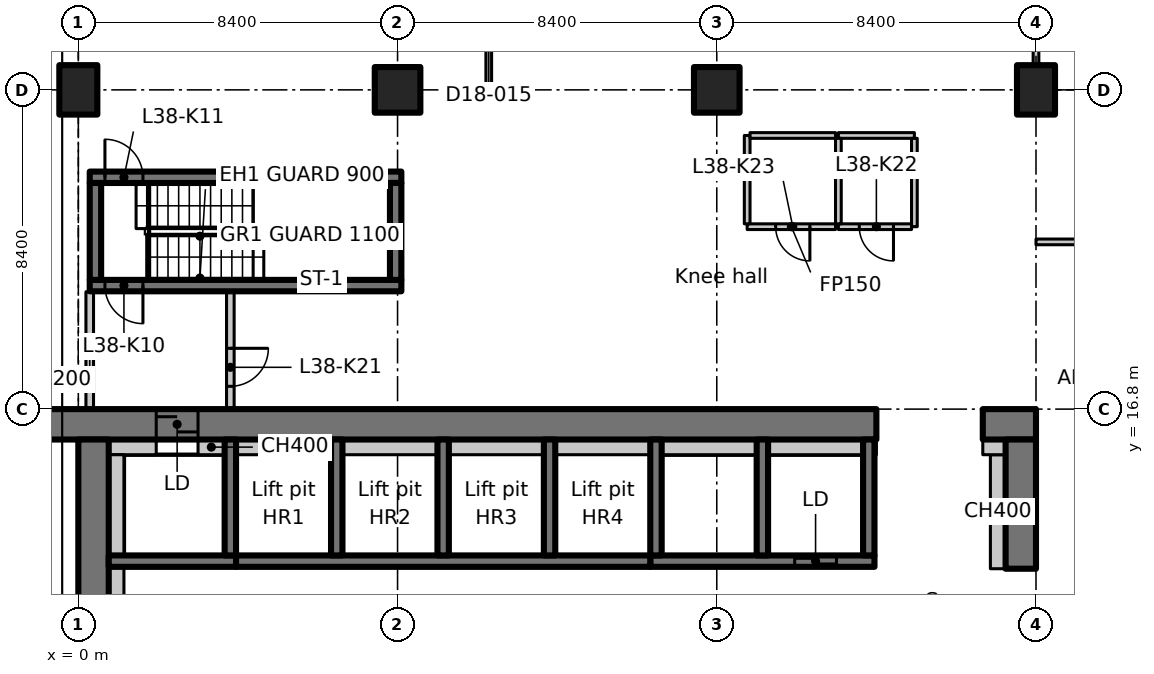
"""IFC4 building model, lengths in metres.
Left out: names, types, materials, properties, quantities, classifications, styles, units other than length and angle.
Written with IfcOpenShell. Run it as: python <this file> out.ifc"""

import sys

from ifc_helpers import new_model, si_unit, direction, frame, frame_2d, origin, origin_2d, place, context, subcontext, project, spatial, polyline, rectangle, outline, extrude, element, fill, save


model = new_model("IFC4")
c1 = context("Model", 3, precision=1e-05, world=origin(), true_north=direction((0.0, 1.0)))
c2 = subcontext(c1, "Body", "Model", "MODEL_VIEW")
j1 = project(units=[si_unit("LENGTHUNIT", "METRE"), si_unit("PLANEANGLEUNIT", "RADIAN")], contexts=[c1])
p1 = place(None, origin())
s1 = spatial("IfcSite", under=j1, at=p1, CompositionType="ELEMENT")
p2 = place(p1, origin())
s2 = spatial("IfcBuilding", under=s1, at=p2, CompositionType="ELEMENT")
p3 = place(p2, frame((0.0, 0.0, 152.9)))
s3 = spatial("IfcBuildingStorey", under=s2, at=p3, CompositionType="ELEMENT", Elevation=152.9)
p4 = place(p3, frame((0.0, 25.2, 0.0), z_axis=(0.0, 0.0, 1.0), x_axis=(1.0, 0.0, 0.0)))
e1 = element("IfcColumn", 1, at=p4, inside=s3, PredefinedType="COLUMN", context=c2, shape_type="SweptSolid", body=[
    extrude(rectangle(XDim=1.0, YDim=1.3, at=origin_2d()), origin(), (0.0, 0.0, 1.0), 3.3),
])
for number, where, z_axis, x_axis in (
    (2, (8.4, 25.2, 0.0), (0.0, 0.0, 1.0), (1.0, 0.0, 0.0)),
    (3, (16.8, 25.2, 0.0), (0.0, 0.0, 1.0), (1.0, 0.0, 0.0)),
):
    element("IfcColumn", number, at=place(p3, frame(where, z_axis=z_axis, x_axis=x_axis)), inside=s3, PredefinedType="COLUMN", context=c2, shape_type="SweptSolid", body=[
        extrude(rectangle(XDim=1.2, YDim=1.2, at=origin_2d()), origin(), (0.0, 0.0, 1.0), 3.3),
    ])
p5 = place(p3, frame((25.2, 25.2, 0.0), z_axis=(0.0, 0.0, 1.0), x_axis=(1.0, 0.0, 0.0)))
e4 = element("IfcColumn", 4, at=p5, inside=s3, PredefinedType="COLUMN", context=c2, shape_type="SweptSolid", body=[
    extrude(rectangle(XDim=1.0, YDim=1.3, at=origin_2d()), origin(), (0.0, 0.0, 1.0), 3.3),
])
p6 = place(p3, frame((-1.1, 16.4, 0.0), z_axis=(0.0, 0.0, 1.0), x_axis=(1.0, 0.0, 0.0)))
e5 = element("IfcWall", 5, at=p6, inside=s3, PredefinedType="SHEAR", context=c2, shape_type="SweptSolid", body=[
    extrude(rectangle(XDim=22.1, YDim=0.8, at=frame_2d((11.05, 0.0))), origin(), (0.0, 0.0, 1.0), 3.3),
])
p7 = place(p6, frame((3.15, 0.0, 0.0)))
e6 = element("IfcOpeningElement", 6, at=p7, cuts=e5, PredefinedType="OPENING", context=c2, shape_type="SweptSolid", body=[
    extrude(rectangle(XDim=1.1, YDim=2.3, at=frame_2d((0.55, 1.15))), frame((0.0, 0.41, 0.0), z_axis=(0.0, -1.0, 0.0), x_axis=(1.0, 0.0, 0.0)), (0.0, 0.0, 1.0), 0.82),
])
p8 = place(p3, frame((23.8, 16.4, 0.0), z_axis=(0.0, 0.0, 1.0), x_axis=(1.0, 0.0, 0.0)))
e7 = element("IfcWall", 7, at=p8, inside=s3, PredefinedType="SHEAR", context=c2, shape_type="SweptSolid", body=[
    extrude(rectangle(XDim=1.4, YDim=0.8, at=frame_2d((0.7, 0.0))), origin(), (0.0, 0.0, 1.0), 3.3),
])
p9 = place(p3, frame((0.4, 7.136, 0.0), z_axis=(0.0, 0.0, 1.0), x_axis=(0.0, 1.0, 0.0)))
e8 = element("IfcWall", 8, at=p9, inside=s3, PredefinedType="SHEAR", context=c2, shape_type="SweptSolid", body=[
    extrude(rectangle(XDim=8.864, YDim=0.8, at=frame_2d((4.432, 0.0))), origin(), (0.0, 0.0, 1.0), 3.3),
])
p10 = place(p3, frame((24.8, 12.6, 0.0), z_axis=(0.0, 0.0, 1.0), x_axis=(0.0, 1.0, 0.0)))
e9 = element("IfcWall", 9, at=p10, inside=s3, PredefinedType="SHEAR", context=c2, shape_type="SweptSolid", body=[
    extrude(rectangle(XDim=3.4, YDim=0.8, at=frame_2d((1.7, 0.0))), origin(), (0.0, 0.0, 1.0), 3.3),
])
p11 = place(p3, frame((24.2, 12.6, 0.0), z_axis=(0.0, 0.0, 1.0), x_axis=(0.0, 1.0, 0.0)))
e10 = element("IfcWall", 10, at=p11, inside=s3, PredefinedType="PARTITIONING", context=c2, shape_type="SweptSolid", body=[
    extrude(rectangle(XDim=3.0, YDim=0.4, at=frame_2d((1.5, 0.0))), origin(), (0.0, 0.0, 1.0), 3.3),
])
p12 = place(p3, frame((0.8, 15.8, 0.0), z_axis=(0.0, 0.0, 1.0), x_axis=(1.0, 0.0, 0.0)))
e11 = element("IfcWall", 11, at=p12, inside=s3, PredefinedType="PARTITIONING", context=c2, shape_type="SweptSolid", body=[
    extrude(rectangle(XDim=1.25, YDim=0.4, at=frame_2d((0.625, 0.0))), origin(), (0.0, 0.0, 1.0), 3.3),
])
p13 = place(p3, frame((23.8, 15.8, 0.0), z_axis=(0.0, 0.0, 1.0), x_axis=(1.0, 0.0, 0.0)))
e12 = element("IfcWall", 12, at=p13, inside=s3, PredefinedType="PARTITIONING", context=c2, shape_type="SweptSolid", body=[
    extrude(rectangle(XDim=0.6, YDim=0.4, at=frame_2d((0.3, 0.0))), origin(), (0.0, 0.0, 1.0), 3.3),
])
p14 = place(p3, frame((0.8, 12.8, 0.0), z_axis=(0.0, 0.0, 1.0), x_axis=(1.0, 0.0, 0.0)))
e13 = element("IfcWall", 13, at=p14, inside=s3, PredefinedType="SHEAR", context=c2, shape_type="SweptSolid", body=[
    extrude(rectangle(XDim=3.35, YDim=0.3, at=frame_2d((1.675, 0.0))), origin(), (0.0, 0.0, 1.0), 3.3),
])
p15 = place(p3, frame((4.0, 12.95, 0.0), z_axis=(0.0, 0.0, 1.0), x_axis=(0.0, 1.0, 0.0)))
e14 = element("IfcWall", 14, at=p15, inside=s3, PredefinedType="SHEAR", context=c2, shape_type="SweptSolid", body=[
    extrude(rectangle(XDim=3.05, YDim=0.3, at=frame_2d((1.525, 0.0))), origin(), (0.0, 0.0, 1.0), 3.3),
])
p16 = place(p3, frame((15.05, 12.8, 0.0), z_axis=(0.0, 0.0, 1.0), x_axis=(1.0, 0.0, 0.0)))
e15 = element("IfcWall", 15, at=p16, inside=s3, PredefinedType="SHEAR", context=c2, shape_type="SweptSolid", body=[
    extrude(rectangle(XDim=5.9, YDim=0.3, at=frame_2d((2.95, 0.0))), origin(), (0.0, 0.0, 1.0), 3.3),
])
p17 = place(p16, frame((3.8, 0.0, 0.0)))
e16 = element("IfcOpeningElement", 16, at=p17, cuts=e15, PredefinedType="OPENING", context=c2, shape_type="SweptSolid", body=[
    extrude(rectangle(XDim=1.1, YDim=2.3, at=frame_2d((0.55, 1.15))), frame((0.0, 0.16, 0.0), z_axis=(0.0, -1.0, 0.0), x_axis=(1.0, 0.0, 0.0)), (0.0, 0.0, 1.0), 0.32),
])
for number, where, z_axis, x_axis in (
    (17, (15.2, 12.95, 0.0), (0.0, 0.0, 1.0), (0.0, 1.0, 0.0)),
    (18, (18.0, 12.95, 0.0), (0.0, 0.0, 1.0), (0.0, 1.0, 0.0)),
    (19, (20.8, 12.95, 0.0), (0.0, 0.0, 1.0), (0.0, 1.0, 0.0)),
):
    element("IfcWall", number, at=place(p3, frame(where, z_axis=z_axis, x_axis=x_axis)), inside=s3, PredefinedType="SHEAR", context=c2, shape_type="SweptSolid", body=[
        extrude(rectangle(XDim=3.05, YDim=0.3, at=frame_2d((1.525, 0.0))), origin(), (0.0, 0.0, 1.0), 3.3),
    ])
p18 = place(p3, frame((4.15, 12.8, 0.0), z_axis=(0.0, 0.0, 1.0), x_axis=(1.0, 0.0, 0.0)))
e20 = element("IfcWall", 20, at=p18, inside=s3, PredefinedType="SHEAR", context=c2, shape_type="SweptSolid", body=[
    extrude(rectangle(XDim=10.9, YDim=0.3, at=frame_2d((5.45, 0.0))), origin(), (0.0, 0.0, 1.0), 3.3),
])
for number, where, z_axis, x_axis in (
    (21, (6.8, 12.95, 0.0), (0.0, 0.0, 1.0), (0.0, 1.0, 0.0)),
    (22, (9.6, 12.95, 0.0), (0.0, 0.0, 1.0), (0.0, 1.0, 0.0)),
    (23, (12.4, 12.95, 0.0), (0.0, 0.0, 1.0), (0.0, 1.0, 0.0)),
):
    element("IfcWall", number, at=place(p3, frame(where, z_axis=z_axis, x_axis=x_axis)), inside=s3, PredefinedType="SHEAR", context=c2, shape_type="SweptSolid", body=[
        extrude(rectangle(XDim=3.05, YDim=0.3, at=frame_2d((1.525, 0.0))), origin(), (0.0, 0.0, 1.0), 3.3),
    ])
p19 = place(p3, frame((8.5, 20.05, 0.0), z_axis=(0.0, 0.0, 1.0), x_axis=(-1.0, 0.0, 0.0)))
e24 = element("IfcWall", 24, at=p19, inside=s3, PredefinedType="SHEAR", context=c2, shape_type="SweptSolid", body=[
    extrude(rectangle(XDim=8.2, YDim=0.3, at=frame_2d((4.1, 0.0))), origin(), (0.0, 0.0, 1.0), 3.3),
])
p20 = place(p19, frame((6.8, 0.0, 0.0)))
e25 = element("IfcOpeningElement", 25, at=p20, cuts=e24, PredefinedType="OPENING", context=c2, shape_type="SweptSolid", body=[
    extrude(rectangle(XDim=1.0, YDim=2.1, at=frame_2d((0.5, 1.05))), frame((0.0, 0.16, 0.0), z_axis=(0.0, -1.0, 0.0), x_axis=(1.0, 0.0, 0.0)), (0.0, 0.0, 1.0), 0.32),
])
p21 = place(p3, frame((0.3, 22.9, 0.0), z_axis=(0.0, 0.0, 1.0), x_axis=(1.0, 0.0, 0.0)))
e26 = element("IfcWall", 26, at=p21, inside=s3, PredefinedType="SHEAR", context=c2, shape_type="SweptSolid", body=[
    extrude(rectangle(XDim=8.2, YDim=0.3, at=frame_2d((4.1, 0.0))), origin(), (0.0, 0.0, 1.0), 3.3),
])
p22 = place(p21, frame((0.4, 0.0, 0.0)))
e27 = element("IfcOpeningElement", 27, at=p22, cuts=e26, PredefinedType="OPENING", context=c2, shape_type="SweptSolid", body=[
    extrude(rectangle(XDim=1.0, YDim=2.1, at=frame_2d((0.5, 1.05))), frame((0.0, 0.16, 0.0), z_axis=(0.0, -1.0, 0.0), x_axis=(1.0, 0.0, 0.0)), (0.0, 0.0, 1.0), 0.32),
])
for number, where, z_axis, x_axis in (
    (28, (0.45, 20.2, 0.0), (0.0, 0.0, 1.0), (0.0, 1.0, 0.0)),
    (29, (8.35, 20.2, 0.0), (0.0, 0.0, 1.0), (0.0, 1.0, 0.0)),
):
    element("IfcWall", number, at=place(p3, frame(where, z_axis=z_axis, x_axis=x_axis)), inside=s3, PredefinedType="SHEAR", context=c2, shape_type="SweptSolid", body=[
        extrude(rectangle(XDim=2.55, YDim=0.3, at=frame_2d((1.275, 0.0))), origin(), (0.0, 0.0, 1.0), 3.3),
    ])
p23 = place(p3, frame((0.3, 16.812, 0.0), z_axis=(0.0, 0.0, 1.0), x_axis=(0.0, 1.0, 0.0)))
e30 = element("IfcWall", 30, at=p23, inside=s3, PredefinedType="PARTITIONING", context=c2, shape_type="SweptSolid", body=[
    extrude(rectangle(XDim=3.076, YDim=0.2, at=frame_2d((1.538, 0.0))), origin(), (0.0, 0.0, 1.0), 2.93),
])
p24 = place(p3, frame((4.0, 19.888, 0.0), z_axis=(0.0, 0.0, 1.0), x_axis=(0.0, -1.0, 0.0)))
e31 = element("IfcWall", 31, at=p24, inside=s3, PredefinedType="PARTITIONING", context=c2, shape_type="SweptSolid", body=[
    extrude(rectangle(XDim=3.076, YDim=0.2, at=frame_2d((1.538, 0.0))), origin(), (0.0, 0.0, 1.0), 3.3),
])
p25 = place(p24, frame((1.488, 0.0, 0.0)))
e32 = element("IfcOpeningElement", 32, at=p25, cuts=e31, PredefinedType="OPENING", context=c2, shape_type="SweptSolid", body=[
    extrude(rectangle(XDim=1.0, YDim=2.1, at=frame_2d((0.5, 1.05))), frame((0.0, 0.11, 0.0), z_axis=(0.0, -1.0, 0.0), x_axis=(1.0, 0.0, 0.0)), (0.0, 0.0, 1.0), 0.22),
])
p26 = place(p3, frame((20.0, 24.0, 0.0), z_axis=(0.0, 0.0, 1.0), x_axis=(1.0, 0.0, 0.0)))
e33 = element("IfcWall", 33, at=p26, inside=s3, PredefinedType="PARTITIONING", context=c2, shape_type="SweptSolid", body=[
    extrude(rectangle(XDim=2.0, YDim=0.15, at=frame_2d((1.0, 0.0))), origin(), (0.0, 0.0, 1.0), 3.3),
])
p27 = place(p3, frame((22.0, 23.925, 0.0), z_axis=(0.0, 0.0, 1.0), x_axis=(0.0, -1.0, 0.0)))
e34 = element("IfcWall", 34, at=p27, inside=s3, PredefinedType="PARTITIONING", context=c2, shape_type="SweptSolid", body=[
    extrude(rectangle(XDim=2.325, YDim=0.15, at=frame_2d((1.163, 0.0))), origin(), (0.0, 0.0, 1.0), 3.3),
])
p28 = place(p3, frame((21.925, 21.6, 0.0), z_axis=(0.0, 0.0, 1.0), x_axis=(-1.0, 0.0, 0.0)))
e35 = element("IfcWall", 35, at=p28, inside=s3, PredefinedType="PARTITIONING", context=c2, shape_type="SweptSolid", body=[
    extrude(rectangle(XDim=1.925, YDim=0.15, at=frame_2d((0.962, 0.0))), origin(), (0.0, 0.0, 1.0), 3.3),
])
p29 = place(p28, frame((0.475, 0.0, 0.0)))
e36 = element("IfcOpeningElement", 36, at=p29, cuts=e35, PredefinedType="OPENING", context=c2, shape_type="SweptSolid", body=[
    extrude(rectangle(XDim=0.9, YDim=2.1, at=frame_2d((0.45, 1.05))), frame((0.0, 0.085, 0.0), z_axis=(0.0, -1.0, 0.0), x_axis=(1.0, 0.0, 0.0)), (0.0, 0.0, 1.0), 0.17),
])
p30 = place(p3, frame((20.0, 21.675, 0.0), z_axis=(0.0, 0.0, 1.0), x_axis=(0.0, 1.0, 0.0)))
e37 = element("IfcWall", 37, at=p30, inside=s3, PredefinedType="PARTITIONING", context=c2, shape_type="SweptSolid", body=[
    extrude(rectangle(XDim=2.25, YDim=0.15, at=frame_2d((1.125, 0.0))), origin(), (0.0, 0.0, 1.0), 3.3),
])
p31 = place(p3, frame((19.925, 21.6, 0.0), z_axis=(0.0, 0.0, 1.0), x_axis=(-1.0, 0.0, 0.0)))
e38 = element("IfcWall", 38, at=p31, inside=s3, PredefinedType="PARTITIONING", context=c2, shape_type="SweptSolid", body=[
    extrude(rectangle(XDim=2.325, YDim=0.15, at=frame_2d((1.163, 0.0))), origin(), (0.0, 0.0, 1.0), 3.3),
])
p32 = place(p31, frame((0.675, 0.0, 0.0)))
e39 = element("IfcOpeningElement", 39, at=p32, cuts=e38, PredefinedType="OPENING", context=c2, shape_type="SweptSolid", body=[
    extrude(rectangle(XDim=0.9, YDim=2.1, at=frame_2d((0.45, 1.05))), frame((0.0, 0.085, 0.0), z_axis=(0.0, -1.0, 0.0), x_axis=(1.0, 0.0, 0.0)), (0.0, 0.0, 1.0), 0.17),
])
p33 = place(p3, frame((17.6, 21.675, 0.0), z_axis=(0.0, 0.0, 1.0), x_axis=(0.0, 1.0, 0.0)))
e40 = element("IfcWall", 40, at=p33, inside=s3, PredefinedType="PARTITIONING", context=c2, shape_type="SweptSolid", body=[
    extrude(rectangle(XDim=2.325, YDim=0.15, at=frame_2d((1.163, 0.0))), origin(), (0.0, 0.0, 1.0), 3.3),
])
p34 = place(p3, frame((17.675, 24.0, 0.0), z_axis=(0.0, 0.0, 1.0), x_axis=(1.0, 0.0, 0.0)))
e41 = element("IfcWall", 41, at=p34, inside=s3, PredefinedType="PARTITIONING", context=c2, shape_type="SweptSolid", body=[
    extrude(rectangle(XDim=2.25, YDim=0.15, at=frame_2d((1.125, 0.0))), origin(), (0.0, 0.0, 1.0), 3.3),
])
p35 = place(p3, frame((1.0, 9.75, 0.0), z_axis=(0.0, 0.0, 1.0), x_axis=(0.0, 1.0, 0.0)))
e42 = element("IfcWall", 42, at=p35, inside=s3, PredefinedType="PARTITIONING", context=c2, shape_type="SweptSolid", body=[
    extrude(rectangle(XDim=2.9, YDim=0.4, at=frame_2d((1.45, 0.0))), origin(), (0.0, 0.0, 1.0), 3.3),
])
p36 = place(p3, frame((1.0, 12.95, 0.0), z_axis=(0.0, 0.0, 1.0), x_axis=(0.0, 1.0, 0.0)))
e43 = element("IfcWall", 43, at=p36, inside=s3, PredefinedType="PARTITIONING", context=c2, shape_type="SweptSolid", body=[
    extrude(rectangle(XDim=2.65, YDim=0.4, at=frame_2d((1.325, 0.0))), origin(), (0.0, 0.0, 1.0), 3.3),
])
p37 = place(p3, frame((3.15, 15.8, 0.0), z_axis=(0.0, 0.0, 1.0), x_axis=(1.0, 0.0, 0.0)))
e44 = element("IfcWall", 44, at=p37, inside=s3, PredefinedType="PARTITIONING", context=c2, shape_type="SweptSolid", body=[
    extrude(rectangle(XDim=0.7, YDim=0.4, at=frame_2d((0.35, 0.0))), origin(), (0.0, 0.0, 1.0), 3.3),
])
for number, where, z_axis, x_axis in (
    (45, (15.35, 15.8, 0.0), (0.0, 0.0, 1.0), (1.0, 0.0, 0.0)),
    (46, (18.15, 15.8, 0.0), (0.0, 0.0, 1.0), (1.0, 0.0, 0.0)),
):
    element("IfcWall", number, at=place(p3, frame(where, z_axis=z_axis, x_axis=x_axis)), inside=s3, PredefinedType="PARTITIONING", context=c2, shape_type="SweptSolid", body=[
        extrude(rectangle(XDim=2.5, YDim=0.4, at=frame_2d((1.25, 0.0))), origin(), (0.0, 0.0, 1.0), 3.3),
    ])
p38 = place(p3, frame((20.95, 15.8, 0.0), z_axis=(0.0, 0.0, 1.0), x_axis=(1.0, 0.0, 0.0)))
e47 = element("IfcWall", 47, at=p38, inside=s3, PredefinedType="PARTITIONING", context=c2, shape_type="SweptSolid", body=[
    extrude(rectangle(XDim=0.05, YDim=0.4, at=frame_2d((0.025, 0.0))), origin(), (0.0, 0.0, 1.0), 3.3),
])
for number, where, z_axis, x_axis in (
    (48, (4.15, 15.8, 0.0), (0.0, 0.0, 1.0), (1.0, 0.0, 0.0)),
    (49, (6.95, 15.8, 0.0), (0.0, 0.0, 1.0), (1.0, 0.0, 0.0)),
    (50, (9.75, 15.8, 0.0), (0.0, 0.0, 1.0), (1.0, 0.0, 0.0)),
    (51, (12.55, 15.8, 0.0), (0.0, 0.0, 1.0), (1.0, 0.0, 0.0)),
):
    element("IfcWall", number, at=place(p3, frame(where, z_axis=z_axis, x_axis=x_axis)), inside=s3, PredefinedType="PARTITIONING", context=c2, shape_type="SweptSolid", body=[
        extrude(rectangle(XDim=2.5, YDim=0.4, at=frame_2d((1.25, 0.0))), origin(), (0.0, 0.0, 1.0), 3.3),
    ])
p39 = place(p3, frame((25.2, 21.2, 0.0), z_axis=(0.0, 0.0, 1.0), x_axis=(1.0, 0.0, 0.0)))
e52 = element("IfcWall", 52, at=p39, inside=s3, PredefinedType="PARTITIONING", context=c2, shape_type="SweptSolid", body=[
    extrude(rectangle(XDim=4.2, YDim=0.15, at=frame_2d((2.1, 0.0))), origin(), (0.0, 0.0, 1.0), 3.28),
])
p40 = place(p3, frame((25.2, 31.0, 0.0), z_axis=(0.0, 0.0, 1.0), x_axis=(0.0, -1.0, 0.0)))
e53 = element("IfcWall", 53, at=p40, inside=s3, PredefinedType="PARTITIONING", context=c2, shape_type="SweptSolid", body=[
    extrude(outline(polyline([(0.0, 0.0), (5.13, 0.0), (5.13, 2.93), (0.0, 2.93), (0.0, 0.0)])), frame((0.0, 0.075, 0.0), z_axis=(0.0, -1.0, 0.0), x_axis=(1.0, 0.0, 0.0)), (0.0, 0.0, 1.0), 0.15),
])
p41 = place(p40, frame((1.93, 0.0, 0.0)))
e54 = element("IfcOpeningElement", 54, at=p41, cuts=e53, PredefinedType="OPENING", context=c2, shape_type="SweptSolid", body=[
    extrude(rectangle(XDim=1.1, YDim=2.1, at=frame_2d((0.55, 1.05))), frame((0.0, 0.085, 0.0), z_axis=(0.0, -1.0, 0.0), x_axis=(1.0, 0.0, 0.0)), (0.0, 0.0, 1.0), 0.17),
])
p42 = place(p3, frame((10.8, 25.2, 0.0), z_axis=(0.0, 0.0, 1.0), x_axis=(0.0, 1.0, 0.0)))
e55 = element("IfcWall", 55, at=p42, inside=s3, PredefinedType="PARTITIONING", context=c2, shape_type="SweptSolid", body=[
    extrude(rectangle(XDim=4.2, YDim=0.15, at=frame_2d((2.1, 0.0))), origin(), (0.0, 0.0, 1.0), 3.28),
])
p43 = place(p42, frame((1.5, 0.0, 0.0)))
e56 = element("IfcOpeningElement", 56, at=p43, cuts=e55, PredefinedType="OPENING", context=c2, shape_type="SweptSolid", body=[
    extrude(rectangle(XDim=1.1, YDim=2.1, at=frame_2d((0.55, 1.05))), frame((0.0, 0.085, 0.0), z_axis=(0.0, -1.0, 0.0), x_axis=(1.0, 0.0, 0.0)), (0.0, 0.0, 1.0), 0.17),
])
p44 = place(p7, origin())
e57 = element("IfcDoor", 57, at=p44, inside=s3, OperationType="SLIDING_TO_LEFT", PredefinedType="DOOR", context=c2, shape_type="SweptSolid", body=[
    extrude(rectangle(XDim=1.1, YDim=2.3, at=frame_2d((0.55, 1.15))), frame((0.0, 0.025, 0.0), z_axis=(0.0, -1.0, 0.0), x_axis=(1.0, 0.0, 0.0)), (0.0, 0.0, 1.0), 0.05),
])
fill(e6, e57)
p45 = place(p17, origin())
e58 = element("IfcDoor", 58, at=p45, inside=s3, OperationType="SLIDING_TO_LEFT", PredefinedType="DOOR", context=c2, shape_type="SweptSolid", body=[
    extrude(rectangle(XDim=1.1, YDim=2.3, at=frame_2d((0.55, 1.15))), frame((0.0, 0.025, 0.0), z_axis=(0.0, -1.0, 0.0), x_axis=(1.0, 0.0, 0.0)), (0.0, 0.0, 1.0), 0.05),
])
fill(e16, e58)
p46 = place(p20, origin())
e59 = element("IfcDoor", 59, at=p46, inside=s3, OperationType="SINGLE_SWING_RIGHT", PredefinedType="DOOR", context=c2, shape_type="SweptSolid", body=[
    extrude(rectangle(XDim=1.0, YDim=2.1, at=frame_2d((0.5, 1.05))), frame((0.0, 0.025, 0.0), z_axis=(0.0, -1.0, 0.0), x_axis=(1.0, 0.0, 0.0)), (0.0, 0.0, 1.0), 0.05),
])
fill(e25, e59)
p47 = place(p22, origin())
e60 = element("IfcDoor", 60, at=p47, inside=s3, OperationType="SINGLE_SWING_LEFT", PredefinedType="DOOR", context=c2, shape_type="SweptSolid", body=[
    extrude(rectangle(XDim=1.0, YDim=2.1, at=frame_2d((0.5, 1.05))), frame((0.0, 0.025, 0.0), z_axis=(0.0, -1.0, 0.0), x_axis=(1.0, 0.0, 0.0)), (0.0, 0.0, 1.0), 0.05),
])
fill(e27, e60)
p48 = place(p25, origin())
e61 = element("IfcDoor", 61, at=p48, inside=s3, OperationType="SINGLE_SWING_LEFT", PredefinedType="DOOR", context=c2, shape_type="SweptSolid", body=[
    extrude(rectangle(XDim=1.0, YDim=2.1, at=frame_2d((0.5, 1.05))), frame((0.0, 0.025, 0.0), z_axis=(0.0, -1.0, 0.0), x_axis=(1.0, 0.0, 0.0)), (0.0, 0.0, 1.0), 0.05),
])
fill(e32, e61)
p49 = place(p29, origin())
e62 = element("IfcDoor", 62, at=p49, inside=s3, OperationType="SINGLE_SWING_RIGHT", PredefinedType="DOOR", context=c2, shape_type="SweptSolid", body=[
    extrude(rectangle(XDim=0.9, YDim=2.1, at=frame_2d((0.45, 1.05))), frame((0.0, 0.025, 0.0), z_axis=(0.0, -1.0, 0.0), x_axis=(1.0, 0.0, 0.0)), (0.0, 0.0, 1.0), 0.05),
])
fill(e36, e62)
p50 = place(p32, origin())
e63 = element("IfcDoor", 63, at=p50, inside=s3, OperationType="SINGLE_SWING_LEFT", PredefinedType="DOOR", context=c2, shape_type="SweptSolid", body=[
    extrude(rectangle(XDim=0.9, YDim=2.1, at=frame_2d((0.45, 1.05))), frame((0.0, 0.025, 0.0), z_axis=(0.0, -1.0, 0.0), x_axis=(1.0, 0.0, 0.0)), (0.0, 0.0, 1.0), 0.05),
])
fill(e39, e63)
save(model, sys.argv[1])
